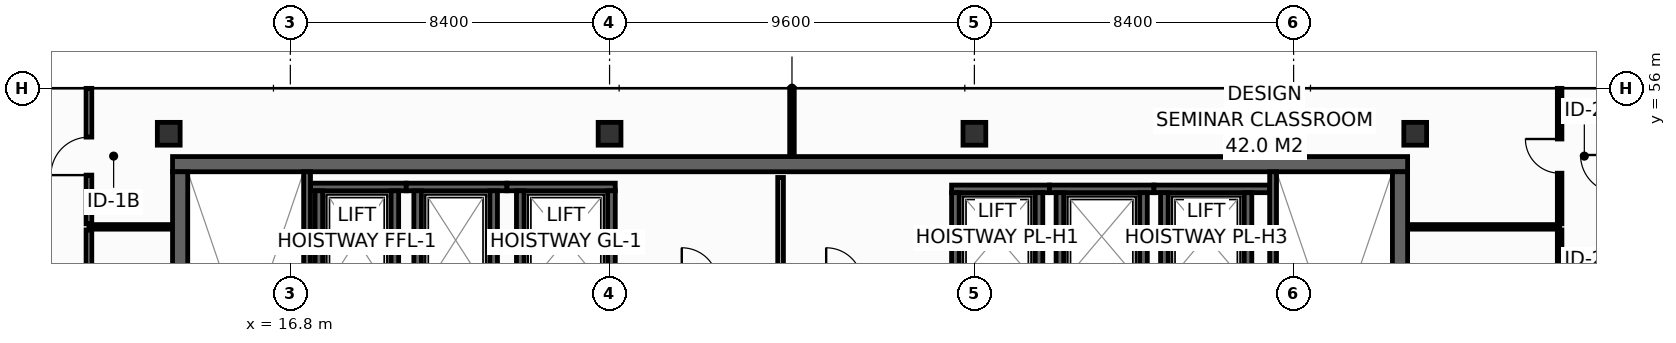
"""IFC4 building model, lengths in metres.
Left out: names, types, materials, properties, quantities, classifications, styles, units other than length and angle.
Written with IfcOpenShell. Run it as: python <this file> out.ifc"""

import sys

from ifc_helpers import new_model, si_unit, direction, frame, frame_2d, origin, origin_2d, place, context, subcontext, project, spatial, rectangle, hollow_rectangle, extrude, element, fill, save


model = new_model("IFC4")
c1 = context("Model", 3, precision=1e-05, world=origin(), true_north=direction((0.0, 1.0)))
c2 = subcontext(c1, "Body", "Model", "MODEL_VIEW")
j1 = project(units=[si_unit("LENGTHUNIT", "METRE"), si_unit("PLANEANGLEUNIT", "RADIAN")], contexts=[c1])
p1 = place(None, origin())
s1 = spatial("IfcSite", under=j1, at=p1, CompositionType="ELEMENT")
p2 = place(p1, origin())
s2 = spatial("IfcBuilding", under=s1, at=p2, CompositionType="ELEMENT")
p3 = place(p2, frame((0.0, 0.0, 323.4)))
s3 = spatial("IfcBuildingStorey", under=s2, at=p3, CompositionType="ELEMENT", Elevation=323.4)
p4 = place(p3, frame((13.7, 54.0, 0.0), z_axis=(0.0, 0.0, 1.0), x_axis=(1.0, 0.0, 0.0)))
e1 = element("IfcWall", 1, at=p4, inside=s3, PredefinedType="SHEAR", context=c2, shape_type="SweptSolid", body=[
    extrude(rectangle(XDim=32.5, YDim=0.4, at=frame_2d((16.25, 0.0))), origin(), (0.0, 0.0, 1.0), 3.9),
])
for number, where, z_axis, x_axis in (
    (2, (13.9, 43.4, 0.0), (0.0, 0.0, 1.0), (0.0, 1.0, 0.0)),
    (3, (46.0, 43.4, 0.0), (0.0, 0.0, 1.0), (0.0, 1.0, 0.0)),
):
    element("IfcWall", number, at=place(p3, frame(where, z_axis=z_axis, x_axis=x_axis)), inside=s3, PredefinedType="SHEAR", context=c2, shape_type="SweptSolid", body=[
        extrude(rectangle(XDim=10.4, YDim=0.4, at=frame_2d((5.2, 0.0))), origin(), (0.0, 0.0, 1.0), 3.9),
    ])
for number, where, z_axis, x_axis in (
    (4, (13.6, 54.8, 0.0), (0.0, 0.0, 1.0), (1.0, 0.0, 0.0)),
    (5, (25.2, 54.8, 0.0), (0.0, 0.0, 1.0), (1.0, 0.0, 0.0)),
    (6, (34.8, 54.8, 0.0), (0.0, 0.0, 1.0), (1.0, 0.0, 0.0)),
    (7, (46.4, 54.8, 0.0), (0.0, 0.0, 1.0), (1.0, 0.0, 0.0)),
):
    element("IfcColumn", number, at=place(p3, frame(where, z_axis=z_axis, x_axis=x_axis)), inside=s3, PredefinedType="COLUMN", context=c2, shape_type="SweptSolid", body=[
        extrude(hollow_rectangle(XDim=0.6, YDim=0.6, WallThickness=0.028, at=origin_2d()), origin(), (0.0, 0.0, 1.0), 4.2),
    ])
p5 = place(p3, frame((17.33, 53.4, 0.0), z_axis=(0.0, 0.0, 1.0), x_axis=(1.0, 0.0, 0.0)))
e8 = element("IfcWall", 8, at=p5, inside=s3, PredefinedType="SHEAR", context=c2, shape_type="SweptSolid", body=[
    extrude(rectangle(XDim=2.52, YDim=0.2, at=frame_2d((1.26, 0.0))), origin(), (0.0, 0.0, 1.0), 3.68),
])
for number, where, z_axis, x_axis in (
    (9, (17.55, 50.7, 0.0), (0.0, 0.0, 1.0), (0.0, 1.0, 0.0)),
    (10, (19.55, 50.7, 0.0), (0.0, 0.0, 1.0), (0.0, 1.0, 0.0)),
):
    element("IfcWall", number, at=place(p3, frame(where, z_axis=z_axis, x_axis=x_axis)), inside=s3, PredefinedType="SHEAR", context=c2, shape_type="SweptSolid", body=[
        extrude(rectangle(XDim=2.6, YDim=0.2, at=frame_2d((1.3, 0.0))), origin(), (0.0, 0.0, 1.0), 3.68),
    ])
p6 = place(p3, frame((19.85, 53.4, 0.0), z_axis=(0.0, 0.0, 1.0), x_axis=(1.0, 0.0, 0.0)))
e11 = element("IfcWall", 11, at=p6, inside=s3, PredefinedType="SHEAR", context=c2, shape_type="SweptSolid", body=[
    extrude(rectangle(XDim=2.65, YDim=0.2, at=frame_2d((1.325, 0.0))), origin(), (0.0, 0.0, 1.0), 3.68),
])
for number, where, z_axis, x_axis in (
    (12, (20.15, 50.7, 0.0), (0.0, 0.0, 1.0), (0.0, 1.0, 0.0)),
    (13, (22.15, 50.7, 0.0), (0.0, 0.0, 1.0), (0.0, 1.0, 0.0)),
):
    element("IfcWall", number, at=place(p3, frame(where, z_axis=z_axis, x_axis=x_axis)), inside=s3, PredefinedType="SHEAR", context=c2, shape_type="SweptSolid", body=[
        extrude(rectangle(XDim=2.6, YDim=0.2, at=frame_2d((1.3, 0.0))), origin(), (0.0, 0.0, 1.0), 3.68),
    ])
p7 = place(p3, frame((22.5, 53.4, 0.0), z_axis=(0.0, 0.0, 1.0), x_axis=(1.0, 0.0, 0.0)))
e14 = element("IfcWall", 14, at=p7, inside=s3, PredefinedType="SHEAR", context=c2, shape_type="SweptSolid", body=[
    extrude(rectangle(XDim=2.85, YDim=0.2, at=frame_2d((1.425, 0.0))), origin(), (0.0, 0.0, 1.0), 3.68),
])
for number, where, z_axis, x_axis in (
    (15, (22.85, 50.7, 0.0), (0.0, 0.0, 1.0), (0.0, 1.0, 0.0)),
    (16, (25.25, 50.7, 0.0), (0.0, 0.0, 1.0), (0.0, 1.0, 0.0)),
):
    element("IfcWall", number, at=place(p3, frame(where, z_axis=z_axis, x_axis=x_axis)), inside=s3, PredefinedType="SHEAR", context=c2, shape_type="SweptSolid", body=[
        extrude(rectangle(XDim=2.6, YDim=0.2, at=frame_2d((1.3, 0.0))), origin(), (0.0, 0.0, 1.0), 3.68),
    ])
p8 = place(p3, frame((34.2, 53.35, 0.0), z_axis=(0.0, 0.0, 1.0), x_axis=(1.0, 0.0, 0.0)))
e17 = element("IfcWall", 17, at=p8, inside=s3, PredefinedType="SHEAR", context=c2, shape_type="SweptSolid", body=[
    extrude(rectangle(XDim=2.575, YDim=0.2, at=frame_2d((1.288, 0.0))), origin(), (0.0, 0.0, 1.0), 3.68),
])
for number, where, z_axis, x_axis in (
    (18, (34.3, 50.95, 0.0), (0.0, 0.0, 1.0), (0.0, 1.0, 0.0)),
    (19, (36.5, 50.95, 0.0), (0.0, 0.0, 1.0), (0.0, 1.0, 0.0)),
):
    element("IfcWall", number, at=place(p3, frame(where, z_axis=z_axis, x_axis=x_axis)), inside=s3, PredefinedType="SHEAR", context=c2, shape_type="SweptSolid", body=[
        extrude(rectangle(XDim=2.3, YDim=0.2, at=frame_2d((1.15, 0.0))), origin(), (0.0, 0.0, 1.0), 3.68),
    ])
p9 = place(p3, frame((36.775, 53.35, 0.0), z_axis=(0.0, 0.0, 1.0), x_axis=(1.0, 0.0, 0.0)))
e20 = element("IfcWall", 20, at=p9, inside=s3, PredefinedType="SHEAR", context=c2, shape_type="SweptSolid", body=[
    extrude(rectangle(XDim=2.75, YDim=0.2, at=frame_2d((1.375, 0.0))), origin(), (0.0, 0.0, 1.0), 3.68),
])
for number, where, z_axis, x_axis in (
    (21, (37.05, 50.95, 0.0), (0.0, 0.0, 1.0), (0.0, 1.0, 0.0)),
    (22, (39.25, 50.95, 0.0), (0.0, 0.0, 1.0), (0.0, 1.0, 0.0)),
):
    element("IfcWall", number, at=place(p3, frame(where, z_axis=z_axis, x_axis=x_axis)), inside=s3, PredefinedType="SHEAR", context=c2, shape_type="SweptSolid", body=[
        extrude(rectangle(XDim=2.3, YDim=0.2, at=frame_2d((1.15, 0.0))), origin(), (0.0, 0.0, 1.0), 3.68),
    ])
p10 = place(p3, frame((39.525, 53.35, 0.0), z_axis=(0.0, 0.0, 1.0), x_axis=(1.0, 0.0, 0.0)))
e23 = element("IfcWall", 23, at=p10, inside=s3, PredefinedType="SHEAR", context=c2, shape_type="SweptSolid", body=[
    extrude(rectangle(XDim=3.045, YDim=0.2, at=frame_2d((1.522, 0.0))), origin(), (0.0, 0.0, 1.0), 3.68),
])
for number, where, z_axis, x_axis in (
    (24, (39.8, 50.95, 0.0), (0.0, 0.0, 1.0), (0.0, 1.0, 0.0)),
    (25, (42.0, 50.95, 0.0), (0.0, 0.0, 1.0), (0.0, 1.0, 0.0)),
):
    element("IfcWall", number, at=place(p3, frame(where, z_axis=z_axis, x_axis=x_axis)), inside=s3, PredefinedType="SHEAR", context=c2, shape_type="SweptSolid", body=[
        extrude(rectangle(XDim=2.3, YDim=0.2, at=frame_2d((1.15, 0.0))), origin(), (0.0, 0.0, 1.0), 3.68),
    ])
p11 = place(p3, frame((17.24, 43.4, 0.0), z_axis=(0.0, 0.0, 1.0), x_axis=(0.0, 1.0, 0.0)))
e26 = element("IfcWall", 26, at=p11, inside=s3, PredefinedType="SHEAR", context=c2, shape_type="SweptSolid", body=[
    extrude(rectangle(XDim=10.4, YDim=0.18, at=frame_2d((5.2, 0.0))), origin(), (0.0, 0.0, 1.0), 3.9),
])
p12 = place(p11, frame((0.16, 0.0, 0.0)))
e27 = element("IfcOpeningElement", 27, at=p12, cuts=e26, PredefinedType="OPENING", context=c2, shape_type="SweptSolid", body=[
    extrude(rectangle(XDim=1.0, YDim=2.15, at=frame_2d((0.5, 1.075))), frame((0.0, 0.1, 0.0), z_axis=(0.0, -1.0, 0.0), x_axis=(1.0, 0.0, 0.0)), (0.0, 0.0, 1.0), 0.2),
])
p13 = place(p3, frame((42.66, 53.8, 0.0), z_axis=(0.0, 0.0, 1.0), x_axis=(0.0, -1.0, 0.0)))
e28 = element("IfcWall", 28, at=p13, inside=s3, PredefinedType="SHEAR", context=c2, shape_type="SweptSolid", body=[
    extrude(rectangle(XDim=10.4, YDim=0.18, at=frame_2d((5.2, 0.0))), origin(), (0.0, 0.0, 1.0), 3.9),
])
p14 = place(p13, frame((8.99, 0.0, 0.0)))
e29 = element("IfcOpeningElement", 29, at=p14, cuts=e28, PredefinedType="OPENING", context=c2, shape_type="SweptSolid", body=[
    extrude(rectangle(XDim=1.1, YDim=2.15, at=frame_2d((0.55, 1.075))), frame((0.0, 0.1, 0.0), z_axis=(0.0, -1.0, 0.0), x_axis=(1.0, 0.0, 0.0)), (0.0, 0.0, 1.0), 0.2),
])
p15 = place(p3, frame((29.7, 50.95, 0.0), z_axis=(0.0, 0.0, 1.0), x_axis=(0.0, 1.0, 0.0)))
e30 = element("IfcWall", 30, at=p15, inside=s3, PredefinedType="PARTITIONING", context=c2, shape_type="SweptSolid", body=[
    extrude(rectangle(XDim=2.7, YDim=0.15, at=frame_2d((1.35, 0.0))), origin(), (0.0, 0.0, 1.0), 3.9),
])
p16 = place(p3, frame((46.22, 52.35, 0.0), z_axis=(0.0, 0.0, 1.0), x_axis=(1.0, 0.0, 0.0)))
e31 = element("IfcWall", 31, at=p16, inside=s3, PredefinedType="PARTITIONING", context=c2, shape_type="SweptSolid", body=[
    extrude(rectangle(XDim=3.98, YDim=0.12, at=frame_2d((1.99, 0.0))), origin(), (0.0, 0.0, 1.0), 3.9),
])
p17 = place(p3, frame((11.5, 52.35, 0.0), z_axis=(0.0, 0.0, 1.0), x_axis=(1.0, 0.0, 0.0)))
e32 = element("IfcWall", 32, at=p17, inside=s3, PredefinedType="PARTITIONING", context=c2, shape_type="SweptSolid", body=[
    extrude(rectangle(XDim=2.18, YDim=0.12, at=frame_2d((1.09, 0.0))), origin(), (0.0, 0.0, 1.0), 3.9),
])
p18 = place(p3, frame((30.0, 54.22, 0.0), z_axis=(0.0, 0.0, 1.0), x_axis=(0.0, 1.0, 0.0)))
e33 = element("IfcWall", 33, at=p18, inside=s3, PredefinedType="PARTITIONING", context=c2, shape_type="SweptSolid", body=[
    extrude(rectangle(XDim=1.775, YDim=0.12, at=frame_2d((0.888, 0.0))), origin(), (0.0, 0.0, 1.0), 3.285),
])
p19 = place(p3, frame((50.2, 48.29, 0.0), z_axis=(0.0, 0.0, 1.0), x_axis=(0.0, 1.0, 0.0)))
e34 = element("IfcWall", 34, at=p19, inside=s3, PredefinedType="PARTITIONING", context=c2, shape_type="SweptSolid", body=[
    extrude(rectangle(XDim=3.98, YDim=0.12, at=frame_2d((1.99, 0.0))), origin(), (0.0, 0.0, 1.0), 3.9),
])
p20 = place(p19, frame((1.54, 0.0, 0.0)))
e35 = element("IfcOpeningElement", 35, at=p20, cuts=e34, PredefinedType="OPENING", context=c2, shape_type="SweptSolid", body=[
    extrude(rectangle(XDim=0.9, YDim=2.1, at=frame_2d((0.45, 1.05))), frame((0.0, 0.07, 0.0), z_axis=(0.0, -1.0, 0.0), x_axis=(1.0, 0.0, 0.0)), (0.0, 0.0, 1.0), 0.14),
])
p21 = place(p3, frame((50.2, 52.43, 0.0), z_axis=(0.0, 0.0, 1.0), x_axis=(0.0, 1.0, 0.0)))
e36 = element("IfcWall", 36, at=p21, inside=s3, PredefinedType="PARTITIONING", context=c2, shape_type="SweptSolid", body=[
    extrude(rectangle(XDim=3.565, YDim=0.12, at=frame_2d((1.783, 0.0))), origin(), (0.0, 0.0, 1.0), 3.285),
])
p22 = place(p21, frame((1.332, 0.0, 0.0)))
e37 = element("IfcOpeningElement", 37, at=p22, cuts=e36, PredefinedType="OPENING", context=c2, shape_type="SweptSolid", body=[
    extrude(rectangle(XDim=0.9, YDim=2.1, at=frame_2d((0.45, 1.05))), frame((0.0, 0.07, 0.0), z_axis=(0.0, -1.0, 0.0), x_axis=(1.0, 0.0, 0.0)), (0.0, 0.0, 1.0), 0.14),
])
p23 = place(p3, frame((11.5, 52.43, 0.0), z_axis=(0.0, 0.0, 1.0), x_axis=(0.0, 1.0, 0.0)))
e38 = element("IfcWall", 38, at=p23, inside=s3, PredefinedType="PARTITIONING", context=c2, shape_type="SweptSolid", body=[
    extrude(rectangle(XDim=3.565, YDim=0.15, at=frame_2d((1.783, 0.0))), origin(), (0.0, 0.0, 1.0), 3.285),
])
p24 = place(p23, frame((1.282, 0.0, 0.0)))
e39 = element("IfcOpeningElement", 39, at=p24, cuts=e38, PredefinedType="OPENING", context=c2, shape_type="SweptSolid", body=[
    extrude(rectangle(XDim=1.0, YDim=2.15, at=frame_2d((0.5, 1.075))), frame((0.0, 0.085, 0.0), z_axis=(0.0, -1.0, 0.0), x_axis=(1.0, 0.0, 0.0)), (0.0, 0.0, 1.0), 0.17),
])
p25 = place(p3, frame((11.5, 46.48, 0.0), z_axis=(0.0, 0.0, 1.0), x_axis=(0.0, 1.0, 0.0)))
e40 = element("IfcWall", 40, at=p25, inside=s3, PredefinedType="PARTITIONING", context=c2, shape_type="SweptSolid", body=[
    extrude(rectangle(XDim=5.79, YDim=0.15, at=frame_2d((2.895, 0.0))), origin(), (0.0, 0.0, 1.0), 3.9),
])
p26 = place(p25, frame((2.395, 0.0, 0.0)))
e41 = element("IfcOpeningElement", 41, at=p26, cuts=e40, PredefinedType="OPENING", context=c2, shape_type="SweptSolid", body=[
    extrude(rectangle(XDim=1.0, YDim=2.15, at=frame_2d((0.5, 1.075))), frame((0.0, 0.085, 0.0), z_axis=(0.0, -1.0, 0.0), x_axis=(1.0, 0.0, 0.0)), (0.0, 0.0, 1.0), 0.17),
])
p27 = place(p22, origin())
e42 = element("IfcDoor", 42, at=p27, inside=s3, OperationType="SINGLE_SWING_RIGHT", PredefinedType="DOOR", context=c2, shape_type="SweptSolid", body=[
    extrude(rectangle(XDim=0.9, YDim=2.1, at=frame_2d((0.45, 1.05))), frame((0.0, 0.025, 0.0), z_axis=(0.0, -1.0, 0.0), x_axis=(1.0, 0.0, 0.0)), (0.0, 0.0, 1.0), 0.05),
])
fill(e37, e42)
p28 = place(p24, origin())
e43 = element("IfcDoor", 43, at=p28, inside=s3, OperationType="SINGLE_SWING_LEFT", PredefinedType="DOOR", context=c2, shape_type="SweptSolid", body=[
    extrude(rectangle(XDim=1.0, YDim=2.15, at=frame_2d((0.5, 1.075))), frame((0.0, 0.025, 0.0), z_axis=(0.0, -1.0, 0.0), x_axis=(1.0, 0.0, 0.0)), (0.0, 0.0, 1.0), 0.05),
])
fill(e39, e43)
save(model, sys.argv[1])
